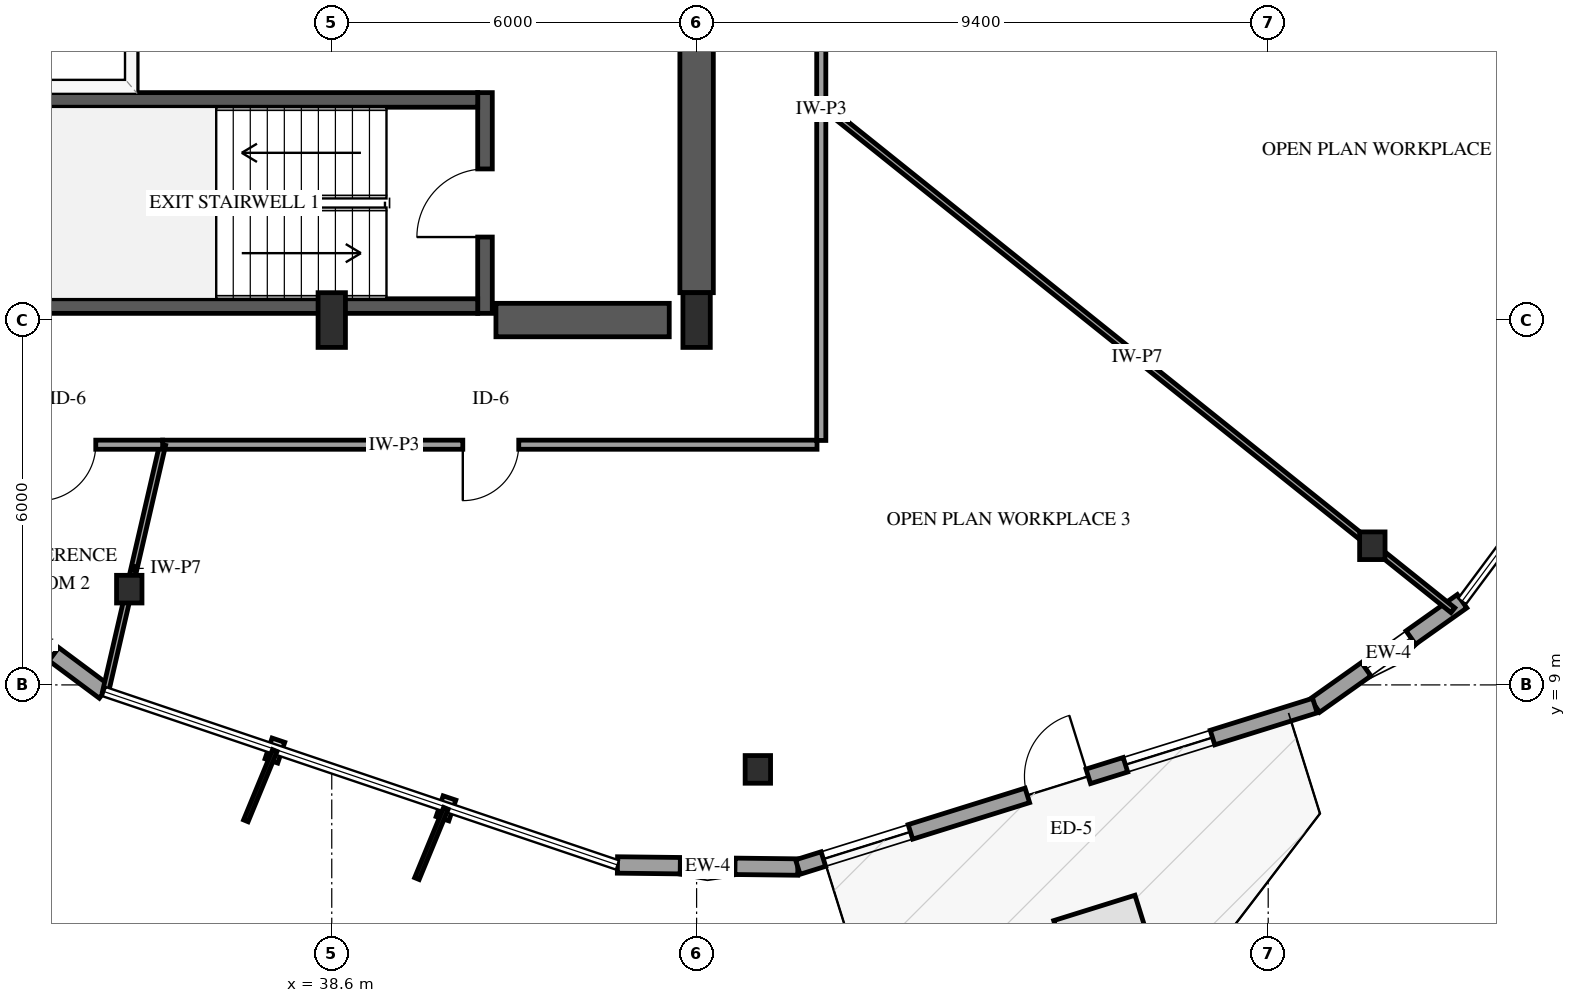
"""IFC4 building model, lengths in metres.
Left out: names, types, materials, properties, quantities, classifications, styles, units other than length and angle.
Written with IfcOpenShell. Run it as: python <this file> out.ifc"""

import sys

from ifc_helpers import new_model, si_unit, direction, frame, frame_2d, origin, origin_2d, place, context, subcontext, project, spatial, rectangle, i_section, extrude, element, fill, save


model = new_model("IFC4")
c1 = context("Model", 3, precision=1e-05, world=origin(), true_north=direction((0.0, 1.0)))
c2 = subcontext(c1, "Body", "Model", "MODEL_VIEW")
j1 = project(units=[si_unit("LENGTHUNIT", "METRE"), si_unit("PLANEANGLEUNIT", "RADIAN")], contexts=[c1])
p1 = place(None, origin())
s1 = spatial("IfcSite", under=j1, at=p1, CompositionType="ELEMENT")
p2 = place(p1, origin())
s2 = spatial("IfcBuilding", under=s1, at=p2, CompositionType="ELEMENT")
p3 = place(p2, frame((0.0, 0.0, 95.2)))
s3 = spatial("IfcBuildingStorey", under=s2, at=p3, CompositionType="ELEMENT", Elevation=95.2)
p4 = place(p3, frame((41.12, 15.11, 0.0), z_axis=(0.0, 0.0, 1.0), x_axis=(0.0, 1.0, 0.0)))
e1 = element("IfcWall", 1, at=p4, inside=s3, PredefinedType="SHEAR", context=c2, shape_type="SweptSolid", body=[
    extrude(rectangle(XDim=3.63, YDim=0.24, at=frame_2d((1.815, 0.0))), origin(), (0.0, 0.0, 1.0), 3.9),
])
p5 = place(p4, frame((1.255, 0.0, 0.0)))
e2 = element("IfcOpeningElement", 2, at=p5, cuts=e1, PredefinedType="OPENING", context=c2, shape_type="SweptSolid", body=[
    extrude(rectangle(XDim=1.12, YDim=2.15, at=frame_2d((0.56, 1.075))), frame((0.0, 0.13, 0.0), z_axis=(0.0, -1.0, 0.0), x_axis=(1.0, 0.0, 0.0)), (0.0, 0.0, 1.0), 0.26),
])
for number, where, z_axis, x_axis in (
    (3, (33.0, 15.23, 0.0), (0.0, 0.0, 1.0), (1.0, 0.0, 0.0)),
    (4, (33.0, 18.62, 0.0), (0.0, 0.0, 1.0), (1.0, 0.0, 0.0)),
):
    element("IfcWall", number, at=place(p3, frame(where, z_axis=z_axis, x_axis=x_axis)), inside=s3, PredefinedType="SHEAR", context=c2, shape_type="SweptSolid", body=[
        extrude(rectangle(XDim=8.0, YDim=0.24, at=frame_2d((4.0, 0.0))), origin(), (0.0, 0.0, 1.0), 3.9),
    ])
p6 = place(p3, frame((41.3, 15.0, 0.0), z_axis=(0.0, 0.0, 1.0), x_axis=(1.0, 0.0, 0.0)))
e5 = element("IfcWall", 5, at=p6, inside=s3, PredefinedType="SHEAR", context=c2, shape_type="SweptSolid", body=[
    extrude(rectangle(XDim=2.85, YDim=0.55, at=frame_2d((1.425, 0.0))), origin(), (0.0, 0.0, 1.0), 3.9),
])
p7 = place(p3, frame((44.6, 15.45, 0.0), z_axis=(0.0, 0.0, 1.0), x_axis=(0.0, 1.0, 0.0)))
e6 = element("IfcWall", 6, at=p7, inside=s3, PredefinedType="SHEAR", context=c2, shape_type="SweptSolid", body=[
    extrude(rectangle(XDim=6.35, YDim=0.55, at=frame_2d((3.175, 0.0))), origin(), (0.0, 0.0, 1.0), 3.9),
])
for number, where, z_axis, x_axis in (
    (7, (38.6, 15.0, 0.0), (0.0, 0.0, 1.0), (1.0, 0.0, 0.0)),
    (8, (44.6, 15.0, 0.0), (0.0, 0.0, 1.0), (1.0, 0.0, 0.0)),
):
    element("IfcColumn", number, at=place(p3, frame(where, z_axis=z_axis, x_axis=x_axis)), inside=s3, PredefinedType="PILASTER", context=c2, shape_type="SweptSolid", body=[
        extrude(rectangle(XDim=0.45, YDim=0.9, at=origin_2d()), origin(), (0.0, 0.0, 1.0), 3.9),
    ])
for number, where, z_axis, x_axis in (
    (9, (35.27, 10.575, 0.0), (0.0, 0.0, 1.0), (1.0, 0.0, 0.0)),
    (10, (45.607, 7.611, 0.0), (0.0, 0.0, 1.0), (1.0, 0.0, 0.0)),
    (11, (55.712, 11.289, 0.0), (0.0, 0.0, 1.0), (1.0, 0.0, 0.0)),
):
    element("IfcColumn", number, at=place(p3, frame(where, z_axis=z_axis, x_axis=x_axis)), inside=s3, PredefinedType="COLUMN", context=c2, shape_type="SweptSolid", body=[
        extrude(i_section(OverallWidth=0.418, OverallDepth=0.455, WebThickness=0.042, FlangeThickness=0.068, FilletRadius=0.038, at=origin_2d()), origin(), (0.0, 0.0, 1.0), 3.9),
    ])
p8 = place(p3, frame((32.478, 10.66, 0.0), z_axis=(0.0, 0.0, 1.0), x_axis=(0.802216720069, -0.597032942175, 0.0)))
e12 = element("IfcWall", 12, at=p8, inside=s3, PredefinedType="SOLIDWALL", context=c2, shape_type="SweptSolid", body=[
    extrude(rectangle(XDim=2.966, YDim=0.27, at=frame_2d((1.483, 0.0))), origin(), (0.0, 0.0, 1.0), 2.979),
])
p9 = place(p8, frame((1.033, 0.0, 0.75)))
e13 = element("IfcOpeningElement", 13, at=p9, cuts=e12, PredefinedType="OPENING", context=c2, shape_type="SweptSolid", body=[
    extrude(rectangle(XDim=0.9, YDim=1.5, at=frame_2d((0.45, 0.75))), frame((0.0, 0.145, 0.0), z_axis=(0.0, -1.0, 0.0), x_axis=(1.0, 0.0, 0.0)), (0.0, 0.0, 1.0), 0.29),
])
p10 = place(p3, frame((43.298, 6.039, 0.0), z_axis=(0.0, 0.0, 1.0), x_axis=(0.99993363199, -0.011520920787, 0.0)))
e14 = element("IfcWall", 14, at=p10, inside=s3, PredefinedType="SOLIDWALL", context=c2, shape_type="SweptSolid", body=[
    extrude(rectangle(XDim=2.967, YDim=0.27, at=frame_2d((1.483, 0.0))), origin(), (0.0, 0.0, 1.0), 2.979),
])
p11 = place(p10, frame((1.033, 0.0, 0.75)))
e15 = element("IfcOpeningElement", 15, at=p11, cuts=e14, PredefinedType="OPENING", context=c2, shape_type="SweptSolid", body=[
    extrude(rectangle(XDim=0.9, YDim=1.5, at=frame_2d((0.45, 0.75))), frame((0.0, 0.145, 0.0), z_axis=(0.0, -1.0, 0.0), x_axis=(1.0, 0.0, 0.0)), (0.0, 0.0, 1.0), 0.29),
])
p12 = place(p3, frame((54.768, 8.66, 0.0), z_axis=(0.0, 0.0, 1.0), x_axis=(0.815686288548, 0.57849449321, 0.0)))
e16 = element("IfcWall", 16, at=p12, inside=s3, PredefinedType="SOLIDWALL", context=c2, shape_type="SweptSolid", body=[
    extrude(rectangle(XDim=2.967, YDim=0.27, at=frame_2d((1.483, 0.0))), origin(), (0.0, 0.0, 1.0), 2.979),
])
p13 = place(p12, frame((1.033, 0.0, 0.75)))
e17 = element("IfcOpeningElement", 17, at=p13, cuts=e16, PredefinedType="OPENING", context=c2, shape_type="SweptSolid", body=[
    extrude(rectangle(XDim=0.9, YDim=1.5, at=frame_2d((0.45, 0.75))), frame((0.0, 0.145, 0.0), z_axis=(0.0, -1.0, 0.0), x_axis=(1.0, 0.0, 0.0)), (0.0, 0.0, 1.0), 0.29),
])
p14 = place(p3, frame((46.265, 6.005, 0.0), z_axis=(0.0, 0.0, 1.0), x_axis=(0.954555531523, 0.298033114332, 0.0)))
e18 = element("IfcWall", 18, at=p14, inside=s3, PredefinedType="SOLIDWALL", context=c2, shape_type="SweptSolid", body=[
    extrude(rectangle(XDim=8.908, YDim=0.25, at=frame_2d((4.454, 0.0))), origin(), (0.0, 0.0, 1.0), 2.979),
])
p15 = place(p14, frame((3.954, 0.0, 0.0)))
e19 = element("IfcOpeningElement", 19, at=p15, cuts=e18, PredefinedType="OPENING", context=c2, shape_type="SweptSolid", body=[
    extrude(rectangle(XDim=1.05, YDim=2.15, at=frame_2d((0.525, 1.075))), frame((0.0, 0.135, 0.0), z_axis=(0.0, -1.0, 0.0), x_axis=(1.0, 0.0, 0.0)), (0.0, 0.0, 1.0), 0.27),
])
p16 = place(p14, frame((0.44, 0.0, 0.72)))
e20 = element("IfcOpeningElement", 20, at=p16, cuts=e18, PredefinedType="OPENING", context=c2, shape_type="SweptSolid", body=[
    extrude(rectangle(XDim=1.5, YDim=1.7, at=frame_2d((0.75, 0.85))), frame((0.0, 0.135, 0.0), z_axis=(0.0, -1.0, 0.0), x_axis=(1.0, 0.0, 0.0)), (0.0, 0.0, 1.0), 0.27),
])
p17 = place(p14, frame((5.644, 0.0, 0.72)))
e21 = element("IfcOpeningElement", 21, at=p17, cuts=e18, PredefinedType="OPENING", context=c2, shape_type="SweptSolid", body=[
    extrude(rectangle(XDim=1.5, YDim=1.7, at=frame_2d((0.75, 0.85))), frame((0.0, 0.135, 0.0), z_axis=(0.0, -1.0, 0.0), x_axis=(1.0, 0.0, 0.0)), (0.0, 0.0, 1.0), 0.27),
])
p18 = place(p3, frame((35.3, 18.79, 0.0), z_axis=(0.0, 0.0, 1.0), x_axis=(0.0, 1.0, 0.0)))
e22 = element("IfcWall", 22, at=p18, inside=s3, PredefinedType="SOLIDWALL", context=c2, shape_type="SweptSolid", body=[
    extrude(rectangle(XDim=2.55, YDim=0.2, at=frame_2d((1.275, 0.0))), origin(), (0.0, 0.0, 1.0), 3.6),
])
p19 = place(p18, frame((0.725, 0.0, 0.0)))
e23 = element("IfcOpeningElement", 23, at=p19, cuts=e22, PredefinedType="OPENING", context=c2, shape_type="SweptSolid", body=[
    extrude(rectangle(XDim=1.1, YDim=2.15, at=frame_2d((0.55, 1.075))), frame((0.0, 0.11, 0.0), z_axis=(0.0, -1.0, 0.0), x_axis=(1.0, 0.0, 0.0)), (0.0, 0.0, 1.0), 0.22),
])
p20 = place(p3, frame((46.65, 18.55, 0.0), z_axis=(0.0, 0.0, 1.0), x_axis=(0.780419428842, -0.625256359492, 0.0)))
e24 = element("IfcWall", 24, at=p20, inside=s3, PredefinedType="PARTITIONING", context=c2, shape_type="SweptSolid", body=[
    extrude(rectangle(XDim=13.31, YDim=0.1, at=frame_2d((6.655, 0.0))), origin(), (0.0, 0.0, 1.0), 2.978),
])
p21 = place(p3, frame((46.58, 12.95, 0.0), z_axis=(0.0, 0.0, 1.0), x_axis=(-1.0, 0.0, 0.0)))
e25 = element("IfcWall", 25, at=p21, inside=s3, PredefinedType="PARTITIONING", context=c2, shape_type="SweptSolid", body=[
    extrude(rectangle(XDim=10.761, YDim=0.15, at=frame_2d((5.38, 0.0))), origin(), (0.0, 0.0, 1.0), 3.6),
])
p22 = place(p21, frame((4.905, 0.0, 0.0)))
e26 = element("IfcOpeningElement", 26, at=p22, cuts=e25, PredefinedType="OPENING", context=c2, shape_type="SweptSolid", body=[
    extrude(rectangle(XDim=0.92, YDim=2.12, at=frame_2d((0.46, 1.06))), frame((0.0, 0.085, 0.0), z_axis=(0.0, -1.0, 0.0), x_axis=(1.0, 0.0, 0.0)), (0.0, 0.0, 1.0), 0.17),
])
p23 = place(p3, frame((46.65, 18.55, 0.0), z_axis=(0.0, 0.0, 1.0), x_axis=(0.0, -1.0, 0.0)))
e27 = element("IfcWall", 27, at=p23, inside=s3, PredefinedType="PARTITIONING", context=c2, shape_type="SweptSolid", body=[
    extrude(rectangle(XDim=5.53, YDim=0.15, at=frame_2d((2.765, 0.0))), origin(), (0.0, 0.0, 1.0), 3.6),
])
p24 = place(p3, frame((46.65, 23.93, 0.0), z_axis=(0.0, 0.0, 1.0), x_axis=(0.0, -1.0, 0.0)))
e28 = element("IfcWall", 28, at=p24, inside=s3, PredefinedType="PARTITIONING", context=c2, shape_type="SweptSolid", body=[
    extrude(rectangle(XDim=5.38, YDim=0.15, at=frame_2d((2.69, 0.0))), origin(), (0.0, 0.0, 1.0), 3.6),
])
p25 = place(p3, frame((35.819, 12.95, 0.0), z_axis=(0.0, 0.0, 1.0), x_axis=(-0.225188335262, -0.974315253736, 0.0)))
e29 = element("IfcWall", 29, at=p25, inside=s3, PredefinedType="PARTITIONING", context=c2, shape_type="SweptSolid", body=[
    extrude(rectangle(XDim=4.175, YDim=0.1, at=frame_2d((2.087, 0.0))), origin(), (0.0, 0.0, 1.0), 2.895),
])
p26 = place(p3, frame((35.819, 12.95, 0.0), z_axis=(0.0, 0.0, 1.0), x_axis=(-1.0, 0.0, 0.0)))
e30 = element("IfcWall", 30, at=p26, inside=s3, PredefinedType="PARTITIONING", context=c2, shape_type="SweptSolid", body=[
    extrude(rectangle(XDim=3.149, YDim=0.15, at=frame_2d((1.575, 0.0))), origin(), (0.0, 0.0, 1.0), 3.6),
])
p27 = place(p26, frame((1.1, 0.0, 0.0)))
e31 = element("IfcOpeningElement", 31, at=p27, cuts=e30, PredefinedType="OPENING", context=c2, shape_type="SweptSolid", body=[
    extrude(rectangle(XDim=0.92, YDim=2.12, at=frame_2d((0.46, 1.06))), frame((0.0, 0.085, 0.0), z_axis=(0.0, -1.0, 0.0), x_axis=(1.0, 0.0, 0.0)), (0.0, 0.0, 1.0), 0.17),
])
p28 = place(p9, origin())
e32 = element("IfcWindow", 32, at=p28, inside=s3, PartitioningType="SINGLE_PANEL", PredefinedType="WINDOW", context=c2, shape_type="SweptSolid", body=[
    extrude(rectangle(XDim=0.9, YDim=1.5, at=frame_2d((0.45, 0.75))), frame((0.0, 0.03, 0.0), z_axis=(0.0, -1.0, 0.0), x_axis=(1.0, 0.0, 0.0)), (0.0, 0.0, 1.0), 0.06),
])
fill(e13, e32)
p29 = place(p11, origin())
e33 = element("IfcWindow", 33, at=p29, inside=s3, PartitioningType="SINGLE_PANEL", PredefinedType="WINDOW", context=c2, shape_type="SweptSolid", body=[
    extrude(rectangle(XDim=0.9, YDim=1.5, at=frame_2d((0.45, 0.75))), frame((0.0, 0.03, 0.0), z_axis=(0.0, -1.0, 0.0), x_axis=(1.0, 0.0, 0.0)), (0.0, 0.0, 1.0), 0.06),
])
fill(e15, e33)
p30 = place(p13, origin())
e34 = element("IfcWindow", 34, at=p30, inside=s3, PartitioningType="SINGLE_PANEL", PredefinedType="WINDOW", context=c2, shape_type="SweptSolid", body=[
    extrude(rectangle(XDim=0.9, YDim=1.5, at=frame_2d((0.45, 0.75))), frame((0.0, 0.03, 0.0), z_axis=(0.0, -1.0, 0.0), x_axis=(1.0, 0.0, 0.0)), (0.0, 0.0, 1.0), 0.06),
])
fill(e17, e34)
p31 = place(p15, origin())
e35 = element("IfcDoor", 35, at=p31, inside=s3, OperationType="SINGLE_SWING_RIGHT", PredefinedType="DOOR", context=c2, shape_type="SweptSolid", body=[
    extrude(rectangle(XDim=1.05, YDim=2.15, at=frame_2d((0.525, 1.075))), frame((0.0, 0.025, 0.0), z_axis=(0.0, -1.0, 0.0), x_axis=(1.0, 0.0, 0.0)), (0.0, 0.0, 1.0), 0.05),
])
fill(e19, e35)
p32 = place(p16, origin())
e36 = element("IfcWindow", 36, at=p32, inside=s3, PartitioningType="SINGLE_PANEL", PredefinedType="WINDOW", context=c2, shape_type="SweptSolid", body=[
    extrude(rectangle(XDim=1.5, YDim=1.7, at=frame_2d((0.75, 0.85))), frame((0.0, 0.03, 0.0), z_axis=(0.0, -1.0, 0.0), x_axis=(1.0, 0.0, 0.0)), (0.0, 0.0, 1.0), 0.06),
])
fill(e20, e36)
p33 = place(p17, origin())
e37 = element("IfcWindow", 37, at=p33, inside=s3, PartitioningType="SINGLE_PANEL", PredefinedType="WINDOW", context=c2, shape_type="SweptSolid", body=[
    extrude(rectangle(XDim=1.5, YDim=1.7, at=frame_2d((0.75, 0.85))), frame((0.0, 0.03, 0.0), z_axis=(0.0, -1.0, 0.0), x_axis=(1.0, 0.0, 0.0)), (0.0, 0.0, 1.0), 0.06),
])
fill(e21, e37)
p34 = place(p5, origin())
e38 = element("IfcDoor", 38, at=p34, inside=s3, OperationType="SINGLE_SWING_LEFT", PredefinedType="DOOR", context=c2, shape_type="SweptSolid", body=[
    extrude(rectangle(XDim=1.12, YDim=2.15, at=frame_2d((0.56, 1.075))), frame((0.0, 0.025, 0.0), z_axis=(0.0, -1.0, 0.0), x_axis=(1.0, 0.0, 0.0)), (0.0, 0.0, 1.0), 0.05),
])
fill(e2, e38)
p35 = place(p22, origin())
e39 = element("IfcDoor", 39, at=p35, inside=s3, OperationType="SINGLE_SWING_RIGHT", PredefinedType="DOOR", context=c2, shape_type="SweptSolid", body=[
    extrude(rectangle(XDim=0.92, YDim=2.12, at=frame_2d((0.46, 1.06))), frame((0.0, 0.025, 0.0), z_axis=(0.0, -1.0, 0.0), x_axis=(1.0, 0.0, 0.0)), (0.0, 0.0, 1.0), 0.05),
])
fill(e26, e39)
p36 = place(p27, origin())
e40 = element("IfcDoor", 40, at=p36, inside=s3, OperationType="SINGLE_SWING_RIGHT", PredefinedType="DOOR", context=c2, shape_type="SweptSolid", body=[
    extrude(rectangle(XDim=0.92, YDim=2.12, at=frame_2d((0.46, 1.06))), frame((0.0, 0.025, 0.0), z_axis=(0.0, -1.0, 0.0), x_axis=(1.0, 0.0, 0.0)), (0.0, 0.0, 1.0), 0.05),
])
fill(e31, e40)
save(model, sys.argv[1])
